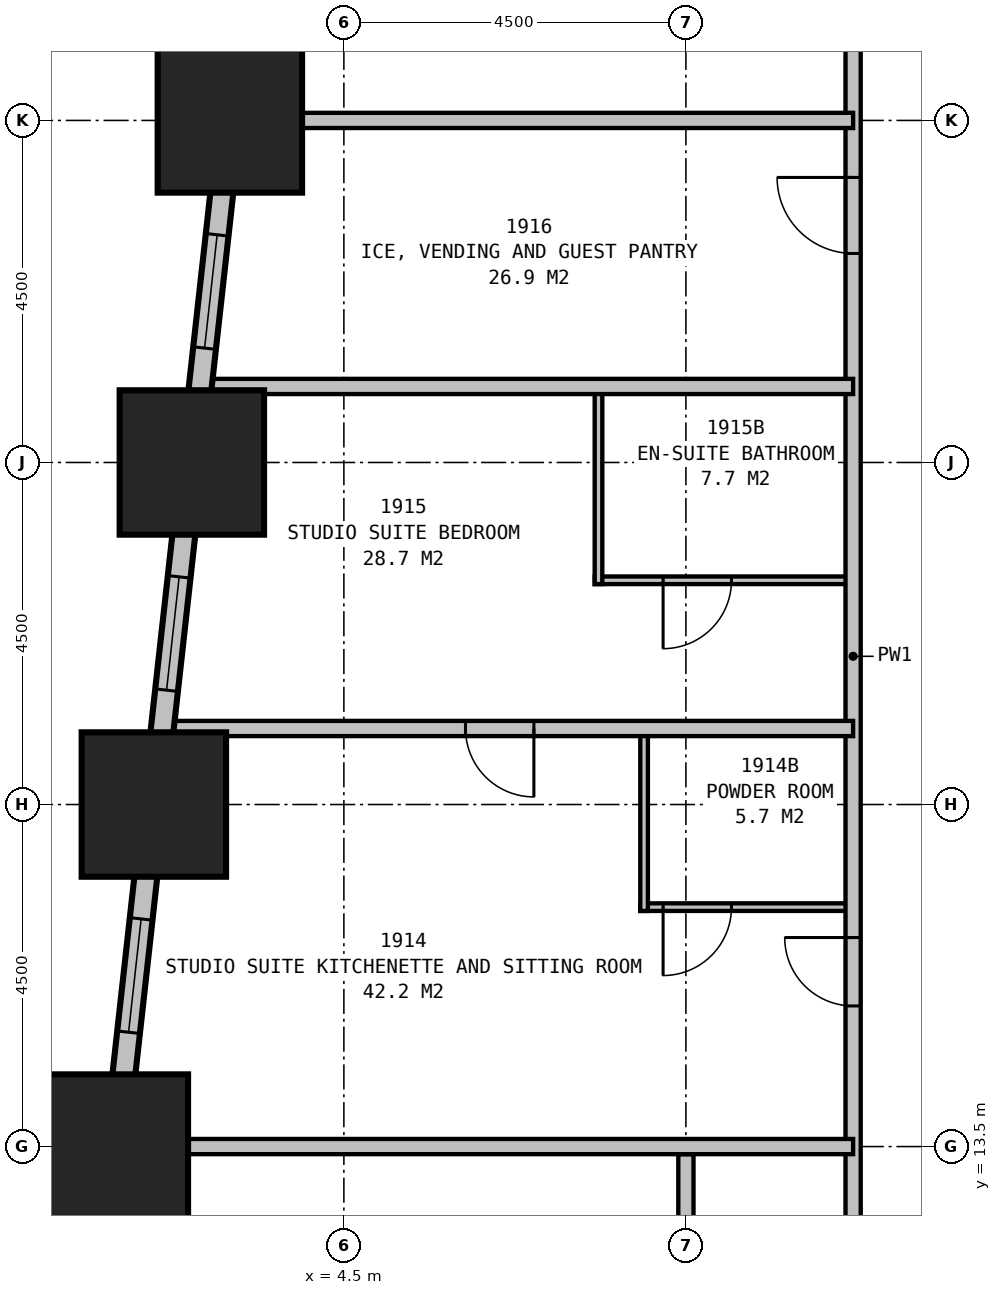
"""IFC4 building model, lengths in metres.
Left out: names, types, materials, properties, quantities, classifications, styles, units other than length and angle.
Written with IfcOpenShell. Run it as: python <this file> out.ifc"""

import sys

from ifc_helpers import new_model, si_unit, direction, frame, frame_2d, origin, origin_2d, place, context, subcontext, project, spatial, rectangle, extrude, element, fill, save


model = new_model("IFC4")
c1 = context("Model", 3, precision=1e-05, world=origin(), true_north=direction((0.0, 1.0)))
c2 = subcontext(c1, "Body", "Model", "MODEL_VIEW")
j1 = project(units=[si_unit("LENGTHUNIT", "METRE"), si_unit("PLANEANGLEUNIT", "RADIAN")], contexts=[c1])
p1 = place(None, origin())
s1 = spatial("IfcSite", under=j1, at=p1, CompositionType="ELEMENT")
p2 = place(p1, origin())
s2 = spatial("IfcBuilding", under=s1, at=p2, CompositionType="ELEMENT")
p3 = place(p2, frame((0.0, 0.0, 78.7)))
s3 = spatial("IfcBuildingStorey", under=s2, at=p3, CompositionType="ELEMENT", Elevation=78.7)
for number, where, z_axis, x_axis in (
    (1, (3.0, 27.0, 0.0), (0.0, 0.0, 1.0), (1.0, 0.0, 0.0)),
    (2, (2.5, 22.5, 0.0), (0.0, 0.0, 1.0), (1.0, 0.0, 0.0)),
    (3, (2.0, 18.0, 0.0), (0.0, 0.0, 1.0), (1.0, 0.0, 0.0)),
    (4, (1.5, 13.5, 0.0), (0.0, 0.0, 1.0), (1.0, 0.0, 0.0)),
):
    element("IfcColumn", number, at=place(p3, frame(where, z_axis=z_axis, x_axis=x_axis)), inside=s3, PredefinedType="COLUMN", context=c2, shape_type="SweptSolid", body=[
        extrude(rectangle(XDim=1.9, YDim=1.9, at=origin_2d()), origin(), (0.0, 0.0, 1.0), 3.5),
    ])
p4 = place(p3, frame((4.017, 36.149, 0.0), z_axis=(0.0, 0.0, 1.0), x_axis=(-0.110433201132, -0.993883548555, 0.0)))
e5 = element("IfcWall", 5, at=p4, inside=s3, PredefinedType="STANDARD", context=c2, shape_type="SweptSolid", body=[
    extrude(rectangle(XDim=31.994, YDim=0.3, at=frame_2d((15.997, 0.0))), origin(), (0.0, 0.0, 1.0), 2.05),
])
p5 = place(p4, frame((1.664, 0.0, 0.5)))
e6 = element("IfcOpeningElement", 6, at=p5, cuts=e5, PredefinedType="OPENING", context=c2, shape_type="SweptSolid", body=[
    extrude(rectangle(XDim=1.5, YDim=1.4, at=frame_2d((0.75, 0.7))), frame((0.0, 0.16, 0.0), z_axis=(0.0, -1.0, 0.0), x_axis=(1.0, 0.0, 0.0)), (0.0, 0.0, 1.0), 0.32),
])
p6 = place(p4, frame((6.192, 0.0, 0.5)))
e7 = element("IfcOpeningElement", 7, at=p6, cuts=e5, PredefinedType="OPENING", context=c2, shape_type="SweptSolid", body=[
    extrude(rectangle(XDim=1.5, YDim=1.4, at=frame_2d((0.75, 0.7))), frame((0.0, 0.16, 0.0), z_axis=(0.0, -1.0, 0.0), x_axis=(1.0, 0.0, 0.0)), (0.0, 0.0, 1.0), 0.32),
])
p7 = place(p4, frame((10.719, 0.0, 0.5)))
e8 = element("IfcOpeningElement", 8, at=p7, cuts=e5, PredefinedType="OPENING", context=c2, shape_type="SweptSolid", body=[
    extrude(rectangle(XDim=1.5, YDim=1.4, at=frame_2d((0.75, 0.7))), frame((0.0, 0.16, 0.0), z_axis=(0.0, -1.0, 0.0), x_axis=(1.0, 0.0, 0.0)), (0.0, 0.0, 1.0), 0.32),
])
p8 = place(p4, frame((15.247, 0.0, 0.5)))
e9 = element("IfcOpeningElement", 9, at=p8, cuts=e5, PredefinedType="OPENING", context=c2, shape_type="SweptSolid", body=[
    extrude(rectangle(XDim=1.5, YDim=1.4, at=frame_2d((0.75, 0.7))), frame((0.0, 0.16, 0.0), z_axis=(0.0, -1.0, 0.0), x_axis=(1.0, 0.0, 0.0)), (0.0, 0.0, 1.0), 0.32),
])
p9 = place(p4, frame((19.775, 0.0, 0.5)))
e10 = element("IfcOpeningElement", 10, at=p9, cuts=e5, PredefinedType="OPENING", context=c2, shape_type="SweptSolid", body=[
    extrude(rectangle(XDim=1.5, YDim=1.4, at=frame_2d((0.75, 0.7))), frame((0.0, 0.16, 0.0), z_axis=(0.0, -1.0, 0.0), x_axis=(1.0, 0.0, 0.0)), (0.0, 0.0, 1.0), 0.32),
])
p10 = place(p4, frame((24.302, 0.0, 0.5)))
e11 = element("IfcOpeningElement", 11, at=p10, cuts=e5, PredefinedType="OPENING", context=c2, shape_type="SweptSolid", body=[
    extrude(rectangle(XDim=1.5, YDim=1.4, at=frame_2d((0.75, 0.7))), frame((0.0, 0.16, 0.0), z_axis=(0.0, -1.0, 0.0), x_axis=(1.0, 0.0, 0.0)), (0.0, 0.0, 1.0), 0.32),
])
p11 = place(p4, frame((28.83, 0.0, 0.5)))
e12 = element("IfcOpeningElement", 12, at=p11, cuts=e5, PredefinedType="OPENING", context=c2, shape_type="SweptSolid", body=[
    extrude(rectangle(XDim=1.5, YDim=1.4, at=frame_2d((0.75, 0.7))), frame((0.0, 0.16, 0.0), z_axis=(0.0, -1.0, 0.0), x_axis=(1.0, 0.0, 0.0)), (0.0, 0.0, 1.0), 0.32),
])
p12 = place(p3, frame((11.2, 10.6, 0.0), z_axis=(0.0, 0.0, 1.0), x_axis=(0.0, 1.0, 0.0)))
e13 = element("IfcWall", 13, at=p12, inside=s3, PredefinedType="PARTITIONING", context=c2, shape_type="SweptSolid", body=[
    extrude(rectangle(XDim=18.7, YDim=0.2, at=frame_2d((9.35, 0.0))), origin(), (0.0, 0.0, 1.0), 3.25),
])
p13 = place(p12, frame((4.75, 0.0, 0.0)))
e14 = element("IfcOpeningElement", 14, at=p13, cuts=e13, PredefinedType="OPENING", context=c2, shape_type="SweptSolid", body=[
    extrude(rectangle(XDim=0.9, YDim=2.1, at=frame_2d((0.45, 1.05))), frame((0.0, 0.11, 0.0), z_axis=(0.0, -1.0, 0.0), x_axis=(1.0, 0.0, 0.0)), (0.0, 0.0, 1.0), 0.22),
])
p14 = place(p12, frame((14.65, 0.0, 0.0)))
e15 = element("IfcOpeningElement", 15, at=p14, cuts=e13, PredefinedType="OPENING", context=c2, shape_type="SweptSolid", body=[
    extrude(rectangle(XDim=1.0, YDim=2.1, at=frame_2d((0.5, 1.05))), frame((0.0, 0.11, 0.0), z_axis=(0.0, -1.0, 0.0), x_axis=(1.0, 0.0, 0.0)), (0.0, 0.0, 1.0), 0.22),
])
p15 = place(p3, frame((11.2, 19.0, 0.0), z_axis=(0.0, 0.0, 1.0), x_axis=(-1.0, 0.0, 0.0)))
e16 = element("IfcWall", 16, at=p15, inside=s3, PredefinedType="PARTITIONING", context=c2, shape_type="SweptSolid", body=[
    extrude(rectangle(XDim=9.088, YDim=0.2, at=frame_2d((4.544, 0.0))), origin(), (0.0, 0.0, 1.0), 3.25),
])
p16 = place(p15, frame((4.2, 0.0, 0.0)))
e17 = element("IfcOpeningElement", 17, at=p16, cuts=e16, PredefinedType="OPENING", context=c2, shape_type="SweptSolid", body=[
    extrude(rectangle(XDim=0.9, YDim=2.1, at=frame_2d((0.45, 1.05))), frame((0.0, 0.11, 0.0), z_axis=(0.0, -1.0, 0.0), x_axis=(1.0, 0.0, 0.0)), (0.0, 0.0, 1.0), 0.22),
])
p17 = place(p3, frame((11.2, 23.5, 0.0), z_axis=(0.0, 0.0, 1.0), x_axis=(-1.0, 0.0, 0.0)))
e18 = element("IfcWall", 18, at=p17, inside=s3, PredefinedType="PARTITIONING", context=c2, shape_type="SweptSolid", body=[
    extrude(rectangle(XDim=8.588, YDim=0.2, at=frame_2d((4.294, 0.0))), origin(), (0.0, 0.0, 1.0), 3.25),
])
p18 = place(p3, frame((8.45, 16.6, 0.0), z_axis=(0.0, 0.0, 1.0), x_axis=(0.0, 1.0, 0.0)))
e19 = element("IfcWall", 19, at=p18, inside=s3, PredefinedType="PLUMBINGWALL", context=c2, shape_type="SweptSolid", body=[
    extrude(rectangle(XDim=2.4, YDim=0.1, at=frame_2d((1.2, 0.0))), origin(), (0.0, 0.0, 1.0), 3.25),
])
p19 = place(p3, frame((11.2, 16.65, 0.0), z_axis=(0.0, 0.0, 1.0), x_axis=(-1.0, 0.0, 0.0)))
e20 = element("IfcWall", 20, at=p19, inside=s3, PredefinedType="PLUMBINGWALL", context=c2, shape_type="SweptSolid", body=[
    extrude(rectangle(XDim=2.8, YDim=0.1, at=frame_2d((1.4, 0.0))), origin(), (0.0, 0.0, 1.0), 3.25),
])
p20 = place(p19, frame((1.6, 0.0, 0.0)))
e21 = element("IfcOpeningElement", 21, at=p20, cuts=e20, PredefinedType="OPENING", context=c2, shape_type="SweptSolid", body=[
    extrude(rectangle(XDim=0.9, YDim=2.1, at=frame_2d((0.45, 1.05))), frame((0.0, 0.06, 0.0), z_axis=(0.0, -1.0, 0.0), x_axis=(1.0, 0.0, 0.0)), (0.0, 0.0, 1.0), 0.12),
])
p21 = place(p3, frame((7.85, 20.9, 0.0), z_axis=(0.0, 0.0, 1.0), x_axis=(0.0, 1.0, 0.0)))
e22 = element("IfcWall", 22, at=p21, inside=s3, PredefinedType="PLUMBINGWALL", context=c2, shape_type="SweptSolid", body=[
    extrude(rectangle(XDim=2.6, YDim=0.1, at=frame_2d((1.3, 0.0))), origin(), (0.0, 0.0, 1.0), 3.25),
])
p22 = place(p3, frame((11.2, 20.95, 0.0), z_axis=(0.0, 0.0, 1.0), x_axis=(-1.0, 0.0, 0.0)))
e23 = element("IfcWall", 23, at=p22, inside=s3, PredefinedType="PLUMBINGWALL", context=c2, shape_type="SweptSolid", body=[
    extrude(rectangle(XDim=3.4, YDim=0.1, at=frame_2d((1.7, 0.0))), origin(), (0.0, 0.0, 1.0), 3.25),
])
p23 = place(p22, frame((1.6, 0.0, 0.0)))
e24 = element("IfcOpeningElement", 24, at=p23, cuts=e23, PredefinedType="OPENING", context=c2, shape_type="SweptSolid", body=[
    extrude(rectangle(XDim=0.9, YDim=2.1, at=frame_2d((0.45, 1.05))), frame((0.0, 0.06, 0.0), z_axis=(0.0, -1.0, 0.0), x_axis=(1.0, 0.0, 0.0)), (0.0, 0.0, 1.0), 0.12),
])
p24 = place(p3, frame((11.2, 13.5, 0.0), z_axis=(0.0, 0.0, 1.0), x_axis=(-1.0, 0.0, 0.0)))
e25 = element("IfcWall", 25, at=p24, inside=s3, PredefinedType="PARTITIONING", context=c2, shape_type="SweptSolid", body=[
    extrude(rectangle(XDim=9.921, YDim=0.2, at=frame_2d((4.96, 0.0))), origin(), (0.0, 0.0, 1.0), 1.95),
])
p25 = place(p3, frame((9.0, 4.6, 0.0), z_axis=(0.0, 0.0, 1.0), x_axis=(0.0, 1.0, 0.0)))
e26 = element("IfcWall", 26, at=p25, inside=s3, PredefinedType="PARTITIONING", context=c2, shape_type="SweptSolid", body=[
    extrude(rectangle(XDim=8.8, YDim=0.2, at=frame_2d((4.4, 0.0))), origin(), (0.0, 0.0, 1.0), 2.25),
])
p26 = place(p25, frame((4.05, 0.0, 0.0)))
e27 = element("IfcOpeningElement", 27, at=p26, cuts=e26, PredefinedType="OPENING", context=c2, shape_type="SweptSolid", body=[
    extrude(rectangle(XDim=0.9, YDim=2.1, at=frame_2d((0.45, 1.05))), frame((0.0, 0.11, 0.0), z_axis=(0.0, -1.0, 0.0), x_axis=(1.0, 0.0, 0.0)), (0.0, 0.0, 1.0), 0.22),
])
p27 = place(p3, frame((11.2, 27.0, 0.0), z_axis=(0.0, 0.0, 1.0), x_axis=(-1.0, 0.0, 0.0)))
e28 = element("IfcWall", 28, at=p27, inside=s3, PredefinedType="PARTITIONING", context=c2, shape_type="SweptSolid", body=[
    extrude(rectangle(XDim=7.977, YDim=0.2, at=frame_2d((3.988, 0.0))), origin(), (0.0, 0.0, 1.0), 1.95),
])
p28 = place(p7, origin())
e29 = element("IfcWindow", 29, at=p28, inside=s3, PartitioningType="SINGLE_PANEL", PredefinedType="WINDOW", context=c2, shape_type="SweptSolid", body=[
    extrude(rectangle(XDim=1.5, YDim=1.4, at=frame_2d((0.75, 0.7))), frame((0.0, 0.03, 0.0), z_axis=(0.0, -1.0, 0.0), x_axis=(1.0, 0.0, 0.0)), (0.0, 0.0, 1.0), 0.06),
])
fill(e8, e29)
p29 = place(p8, origin())
e30 = element("IfcWindow", 30, at=p29, inside=s3, PartitioningType="SINGLE_PANEL", PredefinedType="WINDOW", context=c2, shape_type="SweptSolid", body=[
    extrude(rectangle(XDim=1.5, YDim=1.4, at=frame_2d((0.75, 0.7))), frame((0.0, 0.03, 0.0), z_axis=(0.0, -1.0, 0.0), x_axis=(1.0, 0.0, 0.0)), (0.0, 0.0, 1.0), 0.06),
])
fill(e9, e30)
p30 = place(p9, origin())
e31 = element("IfcWindow", 31, at=p30, inside=s3, PartitioningType="SINGLE_PANEL", PredefinedType="WINDOW", context=c2, shape_type="SweptSolid", body=[
    extrude(rectangle(XDim=1.5, YDim=1.4, at=frame_2d((0.75, 0.7))), frame((0.0, 0.03, 0.0), z_axis=(0.0, -1.0, 0.0), x_axis=(1.0, 0.0, 0.0)), (0.0, 0.0, 1.0), 0.06),
])
fill(e10, e31)
p31 = place(p13, origin())
e32 = element("IfcDoor", 32, at=p31, inside=s3, OperationType="SINGLE_SWING_RIGHT", PredefinedType="DOOR", context=c2, shape_type="SweptSolid", body=[
    extrude(rectangle(XDim=0.9, YDim=2.1, at=frame_2d((0.45, 1.05))), frame((0.0, 0.025, 0.0), z_axis=(0.0, -1.0, 0.0), x_axis=(1.0, 0.0, 0.0)), (0.0, 0.0, 1.0), 0.05),
])
fill(e14, e32)
p32 = place(p14, origin())
e33 = element("IfcDoor", 33, at=p32, inside=s3, OperationType="SINGLE_SWING_RIGHT", PredefinedType="DOOR", context=c2, shape_type="SweptSolid", body=[
    extrude(rectangle(XDim=1.0, YDim=2.1, at=frame_2d((0.5, 1.05))), frame((0.0, 0.025, 0.0), z_axis=(0.0, -1.0, 0.0), x_axis=(1.0, 0.0, 0.0)), (0.0, 0.0, 1.0), 0.05),
])
fill(e15, e33)
p33 = place(p16, origin())
e34 = element("IfcDoor", 34, at=p33, inside=s3, OperationType="SINGLE_SWING_LEFT", PredefinedType="DOOR", context=c2, shape_type="SweptSolid", body=[
    extrude(rectangle(XDim=0.9, YDim=2.1, at=frame_2d((0.45, 1.05))), frame((0.0, 0.025, 0.0), z_axis=(0.0, -1.0, 0.0), x_axis=(1.0, 0.0, 0.0)), (0.0, 0.0, 1.0), 0.05),
])
fill(e17, e34)
p34 = place(p20, origin())
e35 = element("IfcDoor", 35, at=p34, inside=s3, OperationType="SINGLE_SWING_RIGHT", PredefinedType="DOOR", context=c2, shape_type="SweptSolid", body=[
    extrude(rectangle(XDim=0.9, YDim=2.1, at=frame_2d((0.45, 1.05))), frame((0.0, 0.025, 0.0), z_axis=(0.0, -1.0, 0.0), x_axis=(1.0, 0.0, 0.0)), (0.0, 0.0, 1.0), 0.05),
])
fill(e21, e35)
p35 = place(p23, origin())
e36 = element("IfcDoor", 36, at=p35, inside=s3, OperationType="SINGLE_SWING_RIGHT", PredefinedType="DOOR", context=c2, shape_type="SweptSolid", body=[
    extrude(rectangle(XDim=0.9, YDim=2.1, at=frame_2d((0.45, 1.05))), frame((0.0, 0.025, 0.0), z_axis=(0.0, -1.0, 0.0), x_axis=(1.0, 0.0, 0.0)), (0.0, 0.0, 1.0), 0.05),
])
fill(e24, e36)
save(model, sys.argv[1])
